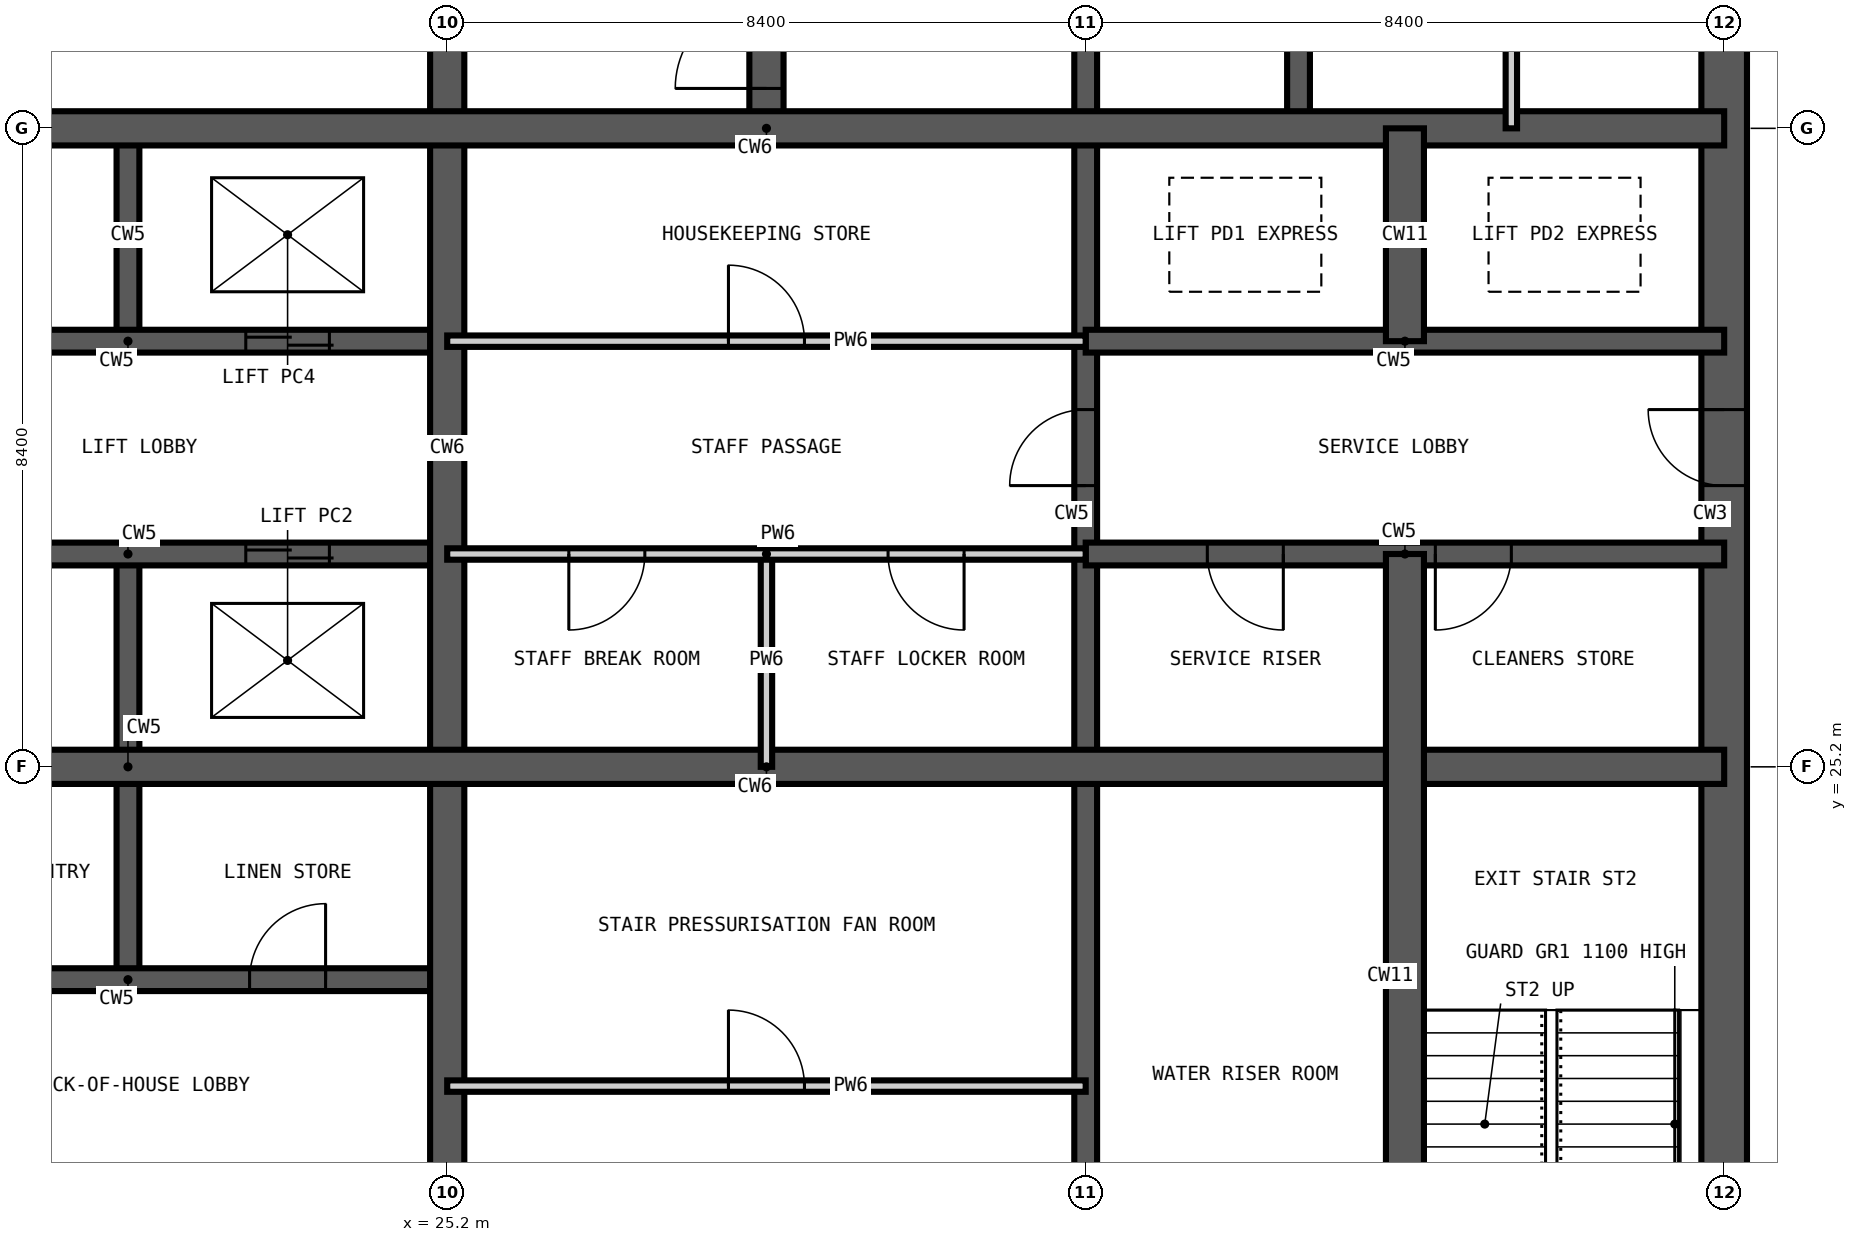
"""IFC4 building model, lengths in metres.
Left out: names, types, materials, properties, quantities, classifications, styles, units other than length and angle.
Written with IfcOpenShell. Run it as: python <this file> out.ifc"""

import sys

from ifc_helpers import new_model, si_unit, direction, frame, frame_2d, origin, place, context, subcontext, project, spatial, rectangle, extrude, element, fill, save


model = new_model("IFC4")
c1 = context("Model", 3, precision=1e-05, world=origin(), true_north=direction((0.0, 1.0)))
c2 = subcontext(c1, "Body", "Model", "MODEL_VIEW")
j1 = project(units=[si_unit("LENGTHUNIT", "METRE"), si_unit("PLANEANGLEUNIT", "RADIAN")], contexts=[c1])
p1 = place(None, origin())
s1 = spatial("IfcSite", under=j1, at=p1, CompositionType="ELEMENT")
p2 = place(p1, origin())
s2 = spatial("IfcBuilding", under=s1, at=p2, CompositionType="ELEMENT")
p3 = place(p2, frame((0.0, 0.0, 180.6)))
s3 = spatial("IfcBuildingStorey", under=s2, at=p3, CompositionType="ELEMENT", Elevation=180.6)
p4 = place(p3, frame((42.0, 17.1, -0.35), z_axis=(0.0, 0.0, 1.0), x_axis=(0.0, 1.0, 0.0)))
e1 = element("IfcWall", 1, at=p4, inside=s3, PredefinedType="SHEAR", context=c2, shape_type="SweptSolid", body=[
    extrude(rectangle(XDim=24.6, YDim=0.6, at=frame_2d((12.3, 0.0))), origin(), (0.0, 0.0, 1.0), 3.6),
])
p5 = place(p4, frame((0.5, 0.0, 0.35)))
e2 = element("IfcOpeningElement", 2, at=p5, cuts=e1, PredefinedType="OPENING", context=c2, shape_type="SweptSolid", body=[
    extrude(rectangle(XDim=1.2, YDim=2.2, at=frame_2d((0.6, 1.1))), frame((0.0, 0.31, 0.0), z_axis=(0.0, -1.0, 0.0), x_axis=(1.0, 0.0, 0.0)), (0.0, 0.0, 1.0), 0.62),
])
p6 = place(p4, frame((11.8, 0.0, 0.35)))
e3 = element("IfcOpeningElement", 3, at=p6, cuts=e1, PredefinedType="OPENING", context=c2, shape_type="SweptSolid", body=[
    extrude(rectangle(XDim=1.0, YDim=2.1, at=frame_2d((0.5, 1.05))), frame((0.0, 0.31, 0.0), z_axis=(0.0, -1.0, 0.0), x_axis=(1.0, 0.0, 0.0)), (0.0, 0.0, 1.0), 0.62),
])
p7 = place(p4, frame((20.2, 0.0, 0.35)))
e4 = element("IfcOpeningElement", 4, at=p7, cuts=e1, PredefinedType="OPENING", context=c2, shape_type="SweptSolid", body=[
    extrude(rectangle(XDim=1.0, YDim=2.1, at=frame_2d((0.5, 1.05))), frame((0.0, 0.31, 0.0), z_axis=(0.0, -1.0, 0.0), x_axis=(1.0, 0.0, 0.0)), (0.0, 0.0, 1.0), 0.62),
])
p8 = place(p3, frame((21.0, 22.4, -0.35), z_axis=(0.0, 0.0, 1.0), x_axis=(0.0, 1.0, 0.0)))
e5 = element("IfcWall", 5, at=p8, inside=s3, PredefinedType="SHEAR", context=c2, shape_type="SweptSolid", body=[
    extrude(rectangle(XDim=5.6, YDim=0.3, at=frame_2d((2.8, 0.0))), origin(), (0.0, 0.0, 1.0), 3.6),
])
p9 = place(p3, frame((21.0, 30.8, -0.35), z_axis=(0.0, 0.0, 1.0), x_axis=(0.0, 1.0, 0.0)))
e6 = element("IfcWall", 6, at=p9, inside=s3, PredefinedType="SHEAR", context=c2, shape_type="SweptSolid", body=[
    extrude(rectangle(XDim=2.8, YDim=0.3, at=frame_2d((1.4, 0.0))), origin(), (0.0, 0.0, 1.0), 3.6),
])
p10 = place(p3, frame((33.6, 16.8, -0.35), z_axis=(0.0, 0.0, 1.0), x_axis=(0.0, 1.0, 0.0)))
e7 = element("IfcWall", 7, at=p10, inside=s3, PredefinedType="SHEAR", context=c2, shape_type="SweptSolid", body=[
    extrude(rectangle(XDim=25.2, YDim=0.3, at=frame_2d((12.6, 0.0))), origin(), (0.0, 0.0, 1.0), 3.6),
])
p11 = place(p10, frame((22.5, 0.0, 0.35)))
e8 = element("IfcOpeningElement", 8, at=p11, cuts=e7, PredefinedType="OPENING", context=c2, shape_type="SweptSolid", body=[
    extrude(rectangle(XDim=1.2, YDim=2.2, at=frame_2d((0.6, 1.1))), frame((0.0, 0.16, 0.0), z_axis=(0.0, -1.0, 0.0), x_axis=(1.0, 0.0, 0.0)), (0.0, 0.0, 1.0), 0.32),
])
p12 = place(p10, frame((18.3, 0.0, 0.35)))
e9 = element("IfcOpeningElement", 9, at=p12, cuts=e7, PredefinedType="OPENING", context=c2, shape_type="SweptSolid", body=[
    extrude(rectangle(XDim=1.2, YDim=2.2, at=frame_2d((0.6, 1.1))), frame((0.0, 0.16, 0.0), z_axis=(0.0, -1.0, 0.0), x_axis=(1.0, 0.0, 0.0)), (0.0, 0.0, 1.0), 0.32),
])
p13 = place(p10, frame((12.1, 0.0, 0.35)))
e10 = element("IfcOpeningElement", 10, at=p13, cuts=e7, PredefinedType="OPENING", context=c2, shape_type="SweptSolid", body=[
    extrude(rectangle(XDim=1.0, YDim=2.1, at=frame_2d((0.5, 1.05))), frame((0.0, 0.16, 0.0), z_axis=(0.0, -1.0, 0.0), x_axis=(1.0, 0.0, 0.0)), (0.0, 0.0, 1.0), 0.32),
])
p14 = place(p3, frame((36.4, 33.6, -0.35), z_axis=(0.0, 0.0, 1.0), x_axis=(0.0, 1.0, 0.0)))
e11 = element("IfcWall", 11, at=p14, inside=s3, PredefinedType="SHEAR", context=c2, shape_type="SweptSolid", body=[
    extrude(rectangle(XDim=8.4, YDim=0.3, at=frame_2d((4.2, 0.0))), origin(), (0.0, 0.0, 1.0), 3.6),
])
p15 = place(p3, frame((16.8, 22.4, -0.35), z_axis=(0.0, 0.0, 1.0), x_axis=(1.0, 0.0, 0.0)))
e12 = element("IfcWall", 12, at=p15, inside=s3, PredefinedType="SHEAR", context=c2, shape_type="SweptSolid", body=[
    extrude(rectangle(XDim=8.4, YDim=0.3, at=frame_2d((4.2, 0.0))), origin(), (0.0, 0.0, 1.0), 3.6),
])
p16 = place(p15, frame((1.6, 0.0, 0.35)))
e13 = element("IfcOpeningElement", 13, at=p16, cuts=e12, PredefinedType="OPENING", context=c2, shape_type="SweptSolid", body=[
    extrude(rectangle(XDim=1.0, YDim=2.1, at=frame_2d((0.5, 1.05))), frame((0.0, 0.16, 0.0), z_axis=(0.0, -1.0, 0.0), x_axis=(1.0, 0.0, 0.0)), (0.0, 0.0, 1.0), 0.32),
])
p17 = place(p15, frame((5.8, 0.0, 0.35)))
e14 = element("IfcOpeningElement", 14, at=p17, cuts=e12, PredefinedType="OPENING", context=c2, shape_type="SweptSolid", body=[
    extrude(rectangle(XDim=1.0, YDim=2.1, at=frame_2d((0.5, 1.05))), frame((0.0, 0.16, 0.0), z_axis=(0.0, -1.0, 0.0), x_axis=(1.0, 0.0, 0.0)), (0.0, 0.0, 1.0), 0.32),
])
p18 = place(p3, frame((16.8, 28.0, -0.35), z_axis=(0.0, 0.0, 1.0), x_axis=(1.0, 0.0, 0.0)))
e15 = element("IfcWall", 15, at=p18, inside=s3, PredefinedType="SHEAR", context=c2, shape_type="SweptSolid", body=[
    extrude(rectangle(XDim=8.4, YDim=0.3, at=frame_2d((4.2, 0.0))), origin(), (0.0, 0.0, 1.0), 3.6),
])
p19 = place(p18, frame((1.55, 0.0, 0.35)))
e16 = element("IfcOpeningElement", 16, at=p19, cuts=e15, PredefinedType="OPENING", context=c2, shape_type="SweptSolid", body=[
    extrude(rectangle(XDim=1.1, YDim=2.2, at=frame_2d((0.55, 1.1))), frame((0.0, 0.16, 0.0), z_axis=(0.0, -1.0, 0.0), x_axis=(1.0, 0.0, 0.0)), (0.0, 0.0, 1.0), 0.32),
])
p20 = place(p18, frame((5.75, 0.0, 0.35)))
e17 = element("IfcOpeningElement", 17, at=p20, cuts=e15, PredefinedType="OPENING", context=c2, shape_type="SweptSolid", body=[
    extrude(rectangle(XDim=1.1, YDim=2.2, at=frame_2d((0.55, 1.1))), frame((0.0, 0.16, 0.0), z_axis=(0.0, -1.0, 0.0), x_axis=(1.0, 0.0, 0.0)), (0.0, 0.0, 1.0), 0.32),
])
p21 = place(p3, frame((33.6, 28.0, -0.35), z_axis=(0.0, 0.0, 1.0), x_axis=(1.0, 0.0, 0.0)))
e18 = element("IfcWall", 18, at=p21, inside=s3, PredefinedType="SHEAR", context=c2, shape_type="SweptSolid", body=[
    extrude(rectangle(XDim=8.4, YDim=0.3, at=frame_2d((4.2, 0.0))), origin(), (0.0, 0.0, 1.0), 3.6),
])
p22 = place(p21, frame((1.6, 0.0, 0.35)))
e19 = element("IfcOpeningElement", 19, at=p22, cuts=e18, PredefinedType="OPENING", context=c2, shape_type="SweptSolid", body=[
    extrude(rectangle(XDim=1.0, YDim=2.1, at=frame_2d((0.5, 1.05))), frame((0.0, 0.16, 0.0), z_axis=(0.0, -1.0, 0.0), x_axis=(1.0, 0.0, 0.0)), (0.0, 0.0, 1.0), 0.32),
])
p23 = place(p21, frame((4.6, 0.0, 0.35)))
e20 = element("IfcOpeningElement", 20, at=p23, cuts=e18, PredefinedType="OPENING", context=c2, shape_type="SweptSolid", body=[
    extrude(rectangle(XDim=1.0, YDim=2.1, at=frame_2d((0.5, 1.05))), frame((0.0, 0.16, 0.0), z_axis=(0.0, -1.0, 0.0), x_axis=(1.0, 0.0, 0.0)), (0.0, 0.0, 1.0), 0.32),
])
p24 = place(p3, frame((16.8, 30.8, -0.35), z_axis=(0.0, 0.0, 1.0), x_axis=(1.0, 0.0, 0.0)))
e21 = element("IfcWall", 21, at=p24, inside=s3, PredefinedType="SHEAR", context=c2, shape_type="SweptSolid", body=[
    extrude(rectangle(XDim=8.4, YDim=0.3, at=frame_2d((4.2, 0.0))), origin(), (0.0, 0.0, 1.0), 3.6),
])
p25 = place(p24, frame((1.55, 0.0, 0.35)))
e22 = element("IfcOpeningElement", 22, at=p25, cuts=e21, PredefinedType="OPENING", context=c2, shape_type="SweptSolid", body=[
    extrude(rectangle(XDim=1.1, YDim=2.2, at=frame_2d((0.55, 1.1))), frame((0.0, 0.16, 0.0), z_axis=(0.0, -1.0, 0.0), x_axis=(1.0, 0.0, 0.0)), (0.0, 0.0, 1.0), 0.32),
])
p26 = place(p24, frame((5.75, 0.0, 0.35)))
e23 = element("IfcOpeningElement", 23, at=p26, cuts=e21, PredefinedType="OPENING", context=c2, shape_type="SweptSolid", body=[
    extrude(rectangle(XDim=1.1, YDim=2.2, at=frame_2d((0.55, 1.1))), frame((0.0, 0.16, 0.0), z_axis=(0.0, -1.0, 0.0), x_axis=(1.0, 0.0, 0.0)), (0.0, 0.0, 1.0), 0.32),
])
p27 = place(p3, frame((33.6, 30.8, -0.35), z_axis=(0.0, 0.0, 1.0), x_axis=(1.0, 0.0, 0.0)))
e24 = element("IfcWall", 24, at=p27, inside=s3, PredefinedType="SHEAR", context=c2, shape_type="SweptSolid", body=[
    extrude(rectangle(XDim=8.4, YDim=0.3, at=frame_2d((4.2, 0.0))), origin(), (0.0, 0.0, 1.0), 3.6),
])
p28 = place(p3, frame((25.2, 16.8, -0.35), z_axis=(0.0, 0.0, 1.0), x_axis=(0.0, 1.0, 0.0)))
e25 = element("IfcWall", 25, at=p28, inside=s3, PredefinedType="SHEAR", context=c2, shape_type="SweptSolid", body=[
    extrude(rectangle(XDim=25.2, YDim=0.45, at=frame_2d((12.6, 0.0))), origin(), (0.0, 0.0, 1.0), 3.6),
])
p29 = place(p3, frame((29.4, 33.6, -0.35), z_axis=(0.0, 0.0, 1.0), x_axis=(0.0, 1.0, 0.0)))
e26 = element("IfcWall", 26, at=p29, inside=s3, PredefinedType="SHEAR", context=c2, shape_type="SweptSolid", body=[
    extrude(rectangle(XDim=8.4, YDim=0.45, at=frame_2d((4.2, 0.0))), origin(), (0.0, 0.0, 1.0), 3.6),
])
p30 = place(p29, frame((0.525, 0.0, 0.35)))
e27 = element("IfcOpeningElement", 27, at=p30, cuts=e26, PredefinedType="OPENING", context=c2, shape_type="SweptSolid", body=[
    extrude(rectangle(XDim=1.2, YDim=2.2, at=frame_2d((0.6, 1.1))), frame((0.0, 0.235, 0.0), z_axis=(0.0, -1.0, 0.0), x_axis=(1.0, 0.0, 0.0)), (0.0, 0.0, 1.0), 0.47),
])
for number, where, z_axis, x_axis in (
    (28, (16.8, 25.2, -0.35), (0.0, 0.0, 1.0), (1.0, 0.0, 0.0)),
    (29, (16.8, 33.6, -0.35), (0.0, 0.0, 1.0), (1.0, 0.0, 0.0)),
):
    element("IfcWall", number, at=place(p3, frame(where, z_axis=z_axis, x_axis=x_axis)), inside=s3, PredefinedType="SHEAR", context=c2, shape_type="SweptSolid", body=[
        extrude(rectangle(XDim=25.2, YDim=0.45, at=frame_2d((12.6, 0.0))), origin(), (0.0, 0.0, 1.0), 3.6),
    ])
p31 = place(p3, frame((37.8, 16.8, -0.35), z_axis=(0.0, 0.0, 1.0), x_axis=(0.0, 1.0, 0.0)))
e30 = element("IfcWall", 30, at=p31, inside=s3, PredefinedType="SHEAR", context=c2, shape_type="SweptSolid", body=[
    extrude(rectangle(XDim=11.2, YDim=0.5, at=frame_2d((5.6, 0.0))), origin(), (0.0, 0.0, 1.0), 3.6),
])
p32 = place(p3, frame((37.8, 30.8, -0.35), z_axis=(0.0, 0.0, 1.0), x_axis=(0.0, 1.0, 0.0)))
e31 = element("IfcWall", 31, at=p32, inside=s3, PredefinedType="SHEAR", context=c2, shape_type="SweptSolid", body=[
    extrude(rectangle(XDim=2.8, YDim=0.5, at=frame_2d((1.4, 0.0))), origin(), (0.0, 0.0, 1.0), 3.6),
])
p33 = place(p3, frame((29.4, 25.2, 0.0), z_axis=(0.0, 0.0, 1.0), x_axis=(0.0, 1.0, 0.0)))
e32 = element("IfcWall", 32, at=p33, inside=s3, PredefinedType="PARTITIONING", context=c2, shape_type="SweptSolid", body=[
    extrude(rectangle(XDim=2.8, YDim=0.15, at=frame_2d((1.4, 0.0))), origin(), (0.0, 0.0, 1.0), 3.25),
])
p34 = place(p3, frame((39.2, 33.6, 0.0), z_axis=(0.0, 0.0, 1.0), x_axis=(0.0, 1.0, 0.0)))
e33 = element("IfcWall", 33, at=p34, inside=s3, PredefinedType="PARTITIONING", context=c2, shape_type="SweptSolid", body=[
    extrude(rectangle(XDim=8.4, YDim=0.15, at=frame_2d((4.2, 0.0))), origin(), (0.0, 0.0, 1.0), 3.25),
])
p35 = place(p34, frame((3.7, 0.0, 0.0)))
e34 = element("IfcOpeningElement", 34, at=p35, cuts=e33, PredefinedType="OPENING", context=c2, shape_type="SweptSolid", body=[
    extrude(rectangle(XDim=1.0, YDim=2.1, at=frame_2d((0.5, 1.05))), frame((0.0, 0.085, 0.0), z_axis=(0.0, -1.0, 0.0), x_axis=(1.0, 0.0, 0.0)), (0.0, 0.0, 1.0), 0.17),
])
p36 = place(p3, frame((25.2, 21.0, 0.0), z_axis=(0.0, 0.0, 1.0), x_axis=(1.0, 0.0, 0.0)))
e35 = element("IfcWall", 35, at=p36, inside=s3, PredefinedType="PARTITIONING", context=c2, shape_type="SweptSolid", body=[
    extrude(rectangle(XDim=8.4, YDim=0.15, at=frame_2d((4.2, 0.0))), origin(), (0.0, 0.0, 1.0), 3.25),
])
p37 = place(p36, frame((3.7, 0.0, 0.0)))
e36 = element("IfcOpeningElement", 36, at=p37, cuts=e35, PredefinedType="OPENING", context=c2, shape_type="SweptSolid", body=[
    extrude(rectangle(XDim=1.0, YDim=2.1, at=frame_2d((0.5, 1.05))), frame((0.0, 0.085, 0.0), z_axis=(0.0, -1.0, 0.0), x_axis=(1.0, 0.0, 0.0)), (0.0, 0.0, 1.0), 0.17),
])
p38 = place(p3, frame((25.2, 28.0, 0.0), z_axis=(0.0, 0.0, 1.0), x_axis=(1.0, 0.0, 0.0)))
e37 = element("IfcWall", 37, at=p38, inside=s3, PredefinedType="PARTITIONING", context=c2, shape_type="SweptSolid", body=[
    extrude(rectangle(XDim=8.4, YDim=0.15, at=frame_2d((4.2, 0.0))), origin(), (0.0, 0.0, 1.0), 3.25),
])
p39 = place(p38, frame((5.8, 0.0, 0.0)))
e38 = element("IfcOpeningElement", 38, at=p39, cuts=e37, PredefinedType="OPENING", context=c2, shape_type="SweptSolid", body=[
    extrude(rectangle(XDim=1.0, YDim=2.1, at=frame_2d((0.5, 1.05))), frame((0.0, 0.085, 0.0), z_axis=(0.0, -1.0, 0.0), x_axis=(1.0, 0.0, 0.0)), (0.0, 0.0, 1.0), 0.17),
])
p40 = place(p38, frame((1.6, 0.0, 0.0)))
e39 = element("IfcOpeningElement", 39, at=p40, cuts=e37, PredefinedType="OPENING", context=c2, shape_type="SweptSolid", body=[
    extrude(rectangle(XDim=1.0, YDim=2.1, at=frame_2d((0.5, 1.05))), frame((0.0, 0.085, 0.0), z_axis=(0.0, -1.0, 0.0), x_axis=(1.0, 0.0, 0.0)), (0.0, 0.0, 1.0), 0.17),
])
p41 = place(p3, frame((25.2, 30.8, 0.0), z_axis=(0.0, 0.0, 1.0), x_axis=(1.0, 0.0, 0.0)))
e40 = element("IfcWall", 40, at=p41, inside=s3, PredefinedType="PARTITIONING", context=c2, shape_type="SweptSolid", body=[
    extrude(rectangle(XDim=8.4, YDim=0.15, at=frame_2d((4.2, 0.0))), origin(), (0.0, 0.0, 1.0), 3.25),
])
p42 = place(p41, frame((3.7, 0.0, 0.0)))
e41 = element("IfcOpeningElement", 41, at=p42, cuts=e40, PredefinedType="OPENING", context=c2, shape_type="SweptSolid", body=[
    extrude(rectangle(XDim=1.0, YDim=2.1, at=frame_2d((0.5, 1.05))), frame((0.0, 0.085, 0.0), z_axis=(0.0, -1.0, 0.0), x_axis=(1.0, 0.0, 0.0)), (0.0, 0.0, 1.0), 0.17),
])
p43 = place(p30, origin())
e42 = element("IfcDoor", 42, at=p43, inside=s3, OperationType="SINGLE_SWING_LEFT", PredefinedType="DOOR", context=c2, shape_type="SweptSolid", body=[
    extrude(rectangle(XDim=1.2, YDim=2.2, at=frame_2d((0.6, 1.1))), frame((0.0, 0.025, 0.0), z_axis=(0.0, -1.0, 0.0), x_axis=(1.0, 0.0, 0.0)), (0.0, 0.0, 1.0), 0.05),
])
fill(e27, e42)
p44 = place(p20, origin())
e43 = element("IfcDoor", 43, at=p44, inside=s3, OperationType="DOUBLE_DOOR_SLIDING", PredefinedType="DOOR", context=c2, shape_type="SweptSolid", body=[
    extrude(rectangle(XDim=1.1, YDim=2.2, at=frame_2d((0.55, 1.1))), frame((0.0, 0.025, 0.0), z_axis=(0.0, -1.0, 0.0), x_axis=(1.0, 0.0, 0.0)), (0.0, 0.0, 1.0), 0.05),
])
fill(e17, e43)
p45 = place(p26, origin())
e44 = element("IfcDoor", 44, at=p45, inside=s3, OperationType="DOUBLE_DOOR_SLIDING", PredefinedType="DOOR", context=c2, shape_type="SweptSolid", body=[
    extrude(rectangle(XDim=1.1, YDim=2.2, at=frame_2d((0.55, 1.1))), frame((0.0, 0.025, 0.0), z_axis=(0.0, -1.0, 0.0), x_axis=(1.0, 0.0, 0.0)), (0.0, 0.0, 1.0), 0.05),
])
fill(e23, e44)
p46 = place(p17, origin())
e45 = element("IfcDoor", 45, at=p46, inside=s3, OperationType="SINGLE_SWING_RIGHT", PredefinedType="DOOR", context=c2, shape_type="SweptSolid", body=[
    extrude(rectangle(XDim=1.0, YDim=2.1, at=frame_2d((0.5, 1.05))), frame((0.0, 0.025, 0.0), z_axis=(0.0, -1.0, 0.0), x_axis=(1.0, 0.0, 0.0)), (0.0, 0.0, 1.0), 0.05),
])
fill(e14, e45)
p47 = place(p13, origin())
e46 = element("IfcDoor", 46, at=p47, inside=s3, OperationType="SINGLE_SWING_LEFT", PredefinedType="DOOR", context=c2, shape_type="SweptSolid", body=[
    extrude(rectangle(XDim=1.0, YDim=2.1, at=frame_2d((0.5, 1.05))), frame((0.0, 0.025, 0.0), z_axis=(0.0, -1.0, 0.0), x_axis=(1.0, 0.0, 0.0)), (0.0, 0.0, 1.0), 0.05),
])
fill(e10, e46)
p48 = place(p39, frame((1.0, 0.0, 0.0), z_axis=(0.0, 0.0, 1.0), x_axis=(-1.0, 0.0, 0.0)))
e47 = element("IfcDoor", 47, at=p48, inside=s3, OperationType="SINGLE_SWING_LEFT", PredefinedType="DOOR", context=c2, shape_type="SweptSolid", body=[
    extrude(rectangle(XDim=1.0, YDim=2.1, at=frame_2d((0.5, 1.05))), frame((0.0, 0.025, 0.0), z_axis=(0.0, -1.0, 0.0), x_axis=(1.0, 0.0, 0.0)), (0.0, 0.0, 1.0), 0.05),
])
fill(e38, e47)
p49 = place(p40, frame((1.0, 0.0, 0.0), z_axis=(0.0, 0.0, 1.0), x_axis=(-1.0, 0.0, 0.0)))
e48 = element("IfcDoor", 48, at=p49, inside=s3, OperationType="SINGLE_SWING_RIGHT", PredefinedType="DOOR", context=c2, shape_type="SweptSolid", body=[
    extrude(rectangle(XDim=1.0, YDim=2.1, at=frame_2d((0.5, 1.05))), frame((0.0, 0.025, 0.0), z_axis=(0.0, -1.0, 0.0), x_axis=(1.0, 0.0, 0.0)), (0.0, 0.0, 1.0), 0.05),
])
fill(e39, e48)
p50 = place(p42, origin())
e49 = element("IfcDoor", 49, at=p50, inside=s3, OperationType="SINGLE_SWING_LEFT", PredefinedType="DOOR", context=c2, shape_type="SweptSolid", body=[
    extrude(rectangle(XDim=1.0, YDim=2.1, at=frame_2d((0.5, 1.05))), frame((0.0, 0.025, 0.0), z_axis=(0.0, -1.0, 0.0), x_axis=(1.0, 0.0, 0.0)), (0.0, 0.0, 1.0), 0.05),
])
fill(e41, e49)
p51 = place(p22, frame((1.0, 0.0, 0.0), z_axis=(0.0, 0.0, 1.0), x_axis=(-1.0, 0.0, 0.0)))
e50 = element("IfcDoor", 50, at=p51, inside=s3, OperationType="SINGLE_SWING_LEFT", PredefinedType="DOOR", context=c2, shape_type="SweptSolid", body=[
    extrude(rectangle(XDim=1.0, YDim=2.1, at=frame_2d((0.5, 1.05))), frame((0.0, 0.025, 0.0), z_axis=(0.0, -1.0, 0.0), x_axis=(1.0, 0.0, 0.0)), (0.0, 0.0, 1.0), 0.05),
])
fill(e19, e50)
p52 = place(p23, frame((1.0, 0.0, 0.0), z_axis=(0.0, 0.0, 1.0), x_axis=(-1.0, 0.0, 0.0)))
e51 = element("IfcDoor", 51, at=p52, inside=s3, OperationType="SINGLE_SWING_RIGHT", PredefinedType="DOOR", context=c2, shape_type="SweptSolid", body=[
    extrude(rectangle(XDim=1.0, YDim=2.1, at=frame_2d((0.5, 1.05))), frame((0.0, 0.025, 0.0), z_axis=(0.0, -1.0, 0.0), x_axis=(1.0, 0.0, 0.0)), (0.0, 0.0, 1.0), 0.05),
])
fill(e20, e51)
p53 = place(p6, origin())
e52 = element("IfcDoor", 52, at=p53, inside=s3, OperationType="SINGLE_SWING_RIGHT", PredefinedType="DOOR", context=c2, shape_type="SweptSolid", body=[
    extrude(rectangle(XDim=1.0, YDim=2.1, at=frame_2d((0.5, 1.05))), frame((0.0, 0.025, 0.0), z_axis=(0.0, -1.0, 0.0), x_axis=(1.0, 0.0, 0.0)), (0.0, 0.0, 1.0), 0.05),
])
fill(e3, e52)
p54 = place(p37, origin())
e53 = element("IfcDoor", 53, at=p54, inside=s3, OperationType="SINGLE_SWING_LEFT", PredefinedType="DOOR", context=c2, shape_type="SweptSolid", body=[
    extrude(rectangle(XDim=1.0, YDim=2.1, at=frame_2d((0.5, 1.05))), frame((0.0, 0.025, 0.0), z_axis=(0.0, -1.0, 0.0), x_axis=(1.0, 0.0, 0.0)), (0.0, 0.0, 1.0), 0.05),
])
fill(e36, e53)
save(model, sys.argv[1])
